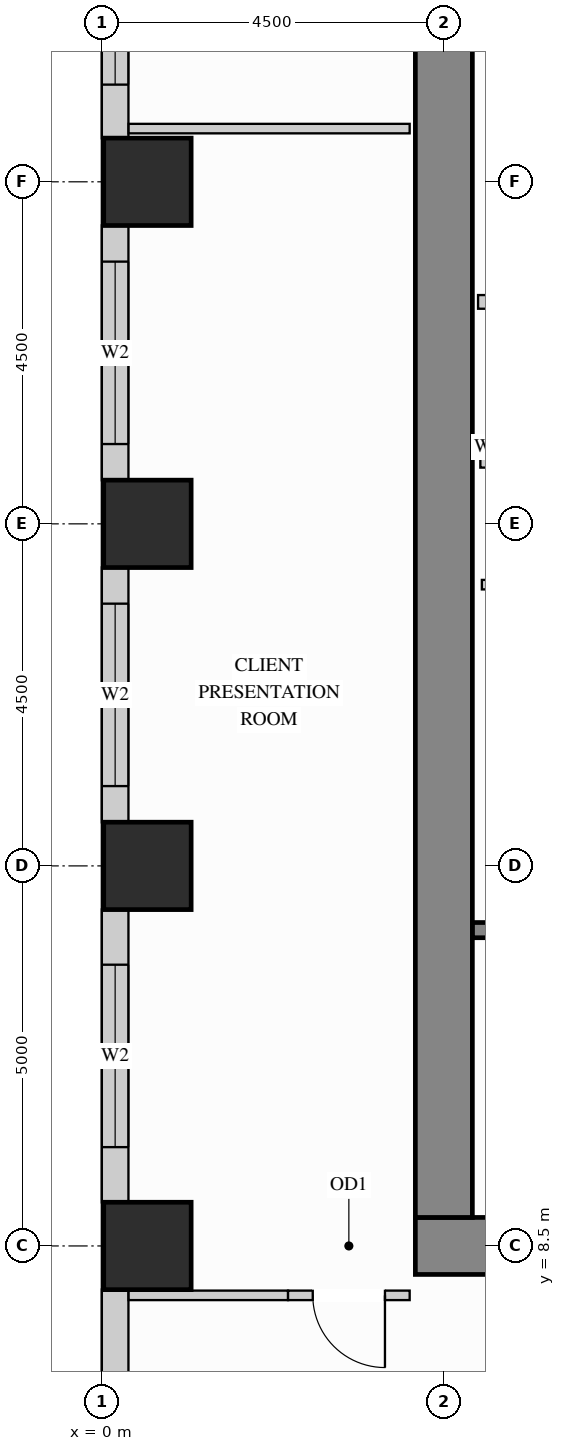
"""IFC4 building model, lengths in metres.
Left out: names, types, materials, properties, quantities, classifications, styles, units other than length and angle.
Written with IfcOpenShell. Run it as: python <this file> out.ifc"""

import sys

from ifc_helpers import new_model, si_unit, direction, frame, frame_2d, origin, origin_2d, place, context, subcontext, project, spatial, rectangle, extrude, source, transform, mapped, element, fill, save


model = new_model("IFC4")
c1 = context("Model", 3, precision=1e-05, world=origin(), true_north=direction((0.0, 1.0)))
c2 = subcontext(c1, "Body", "Model", "MODEL_VIEW")
j1 = project(units=[si_unit("LENGTHUNIT", "METRE"), si_unit("PLANEANGLEUNIT", "RADIAN")], contexts=[c1])
p1 = place(None, origin())
s1 = spatial("IfcSite", under=j1, at=p1, CompositionType="ELEMENT")
p2 = place(p1, origin())
s2 = spatial("IfcBuilding", under=s1, at=p2, CompositionType="ELEMENT")
p3 = place(p2, frame((0.0, 0.0, 109.8)))
s3 = spatial("IfcBuildingStorey", under=s2, at=p3, CompositionType="ELEMENT", Elevation=109.8)
m1 = source(origin(), c2, "Body", "SweptSolid", [
    extrude(rectangle(XDim=1.15, YDim=1.15, at=origin_2d()), origin(), (0.0, 0.0, 1.0), 3.38),
])
for number, where, z_axis, x_axis in (
    (1, (0.6, 13.5, 0.0), (0.0, 0.0, 1.0), (1.0, 0.0, 0.0)),
    (2, (0.6, 18.0, 0.0), (0.0, 0.0, 1.0), (1.0, 0.0, 0.0)),
    (3, (0.6, 22.5, 0.0), (0.0, 0.0, 1.0), (1.0, 0.0, 0.0)),
    (4, (0.6, 8.5, 0.0), (0.0, 0.0, 1.0), (1.0, 0.0, 0.0)),
):
    element("IfcColumn", number, at=place(p3, frame(where, z_axis=z_axis, x_axis=x_axis)), inside=s3, PredefinedType="COLUMN", context=c2, shape_type="MappedRepresentation", body=[
        mapped(m1, transform((0.0, 0.0, 0.0), x_axis=(1.0, 0.0, 0.0), y_axis=(0.0, 1.0, 0.0), z_axis=(0.0, 0.0, 1.0))),
    ])
m2 = source(origin(), c2, "Body", "SweptSolid", [
    extrude(rectangle(XDim=10.75, YDim=0.75, at=frame_2d((5.375, 0.0))), origin(), (0.0, 0.0, 1.0), 3.38),
])
p4 = place(p3, frame((4.125, 8.5, 0.0), z_axis=(0.0, 0.0, 1.0), x_axis=(1.0, 0.0, 0.0)))
e5 = element("IfcWall", 5, at=p4, inside=s3, PredefinedType="SHEAR", context=c2, shape_type="MappedRepresentation", body=[
    mapped(m2, transform((0.0, 0.0, 0.0), x_axis=(1.0, 0.0, 0.0), y_axis=(0.0, 1.0, 0.0), z_axis=(0.0, 0.0, 1.0))),
])
m3 = source(origin(), c2, "Body", "SweptSolid", [
    extrude(rectangle(XDim=20.25, YDim=0.75, at=frame_2d((10.125, 0.0))), origin(), (0.0, 0.0, 1.0), 3.38),
])
p5 = place(p3, frame((4.5, 8.875, 0.0), z_axis=(0.0, 0.0, 1.0), x_axis=(0.0, 1.0, 0.0)))
e6 = element("IfcWall", 6, at=p5, inside=s3, PredefinedType="SHEAR", context=c2, shape_type="MappedRepresentation", body=[
    mapped(m3, transform((0.0, 0.0, 0.0), x_axis=(1.0, 0.0, 0.0), y_axis=(0.0, 1.0, 0.0), z_axis=(0.0, 0.0, 1.0))),
])
p6 = place(p3, frame((0.175, 26.227, 0.0), z_axis=(0.0, 0.0, 1.0), x_axis=(0.0, -1.0, 0.0)))
e7 = element("IfcWall", 7, at=p6, inside=s3, PredefinedType="SOLIDWALL", context=c2, shape_type="SweptSolid", body=[
    extrude(rectangle(XDim=3.154, YDim=0.35, at=frame_2d((1.577, 0.0))), origin(), (0.0, 0.0, 1.0), 3.365),
])
p7 = place(p6, frame((0.648, 0.0, 0.78)))
e8 = element("IfcOpeningElement", 8, at=p7, cuts=e7, PredefinedType="OPENING", context=c2, shape_type="SweptSolid", body=[
    extrude(rectangle(XDim=1.8, YDim=2.1, at=frame_2d((0.9, 1.05))), frame((0.0, 0.185, 0.0), z_axis=(0.0, -1.0, 0.0), x_axis=(1.0, 0.0, 0.0)), (0.0, 0.0, 1.0), 0.37),
])
p8 = place(p3, frame((0.175, 21.927, 0.0), z_axis=(0.0, 0.0, 1.0), x_axis=(0.0, -1.0, 0.0)))
e9 = element("IfcWall", 9, at=p8, inside=s3, PredefinedType="SOLIDWALL", context=c2, shape_type="SweptSolid", body=[
    extrude(rectangle(XDim=3.354, YDim=0.35, at=frame_2d((1.677, 0.0))), origin(), (0.0, 0.0, 1.0), 3.365),
])
p9 = place(p8, frame((0.477, 0.0, 0.78)))
e10 = element("IfcOpeningElement", 10, at=p9, cuts=e9, PredefinedType="OPENING", context=c2, shape_type="SweptSolid", body=[
    extrude(rectangle(XDim=2.4, YDim=2.1, at=frame_2d((1.2, 1.05))), frame((0.0, 0.185, 0.0), z_axis=(0.0, -1.0, 0.0), x_axis=(1.0, 0.0, 0.0)), (0.0, 0.0, 1.0), 0.37),
])
p10 = place(p3, frame((0.175, 17.427, 0.0), z_axis=(0.0, 0.0, 1.0), x_axis=(0.0, -1.0, 0.0)))
e11 = element("IfcWall", 11, at=p10, inside=s3, PredefinedType="SOLIDWALL", context=c2, shape_type="SweptSolid", body=[
    extrude(rectangle(XDim=3.354, YDim=0.35, at=frame_2d((1.677, 0.0))), origin(), (0.0, 0.0, 1.0), 3.365),
])
p11 = place(p10, frame((0.477, 0.0, 0.78)))
e12 = element("IfcOpeningElement", 12, at=p11, cuts=e11, PredefinedType="OPENING", context=c2, shape_type="SweptSolid", body=[
    extrude(rectangle(XDim=2.4, YDim=2.1, at=frame_2d((1.2, 1.05))), frame((0.0, 0.185, 0.0), z_axis=(0.0, -1.0, 0.0), x_axis=(1.0, 0.0, 0.0)), (0.0, 0.0, 1.0), 0.37),
])
p12 = place(p3, frame((0.175, 12.927, 0.0), z_axis=(0.0, 0.0, 1.0), x_axis=(0.0, -1.0, 0.0)))
e13 = element("IfcWall", 13, at=p12, inside=s3, PredefinedType="SOLIDWALL", context=c2, shape_type="SweptSolid", body=[
    extrude(rectangle(XDim=3.854, YDim=0.35, at=frame_2d((1.927, 0.0))), origin(), (0.0, 0.0, 1.0), 3.365),
])
p13 = place(p12, frame((0.727, 0.0, 0.78)))
e14 = element("IfcOpeningElement", 14, at=p13, cuts=e13, PredefinedType="OPENING", context=c2, shape_type="SweptSolid", body=[
    extrude(rectangle(XDim=2.4, YDim=2.1, at=frame_2d((1.2, 1.05))), frame((0.0, 0.185, 0.0), z_axis=(0.0, -1.0, 0.0), x_axis=(1.0, 0.0, 0.0)), (0.0, 0.0, 1.0), 0.37),
])
p14 = place(p3, frame((0.175, 7.927, 0.0), z_axis=(0.0, 0.0, 1.0), x_axis=(0.0, -1.0, 0.0)))
e15 = element("IfcWall", 15, at=p14, inside=s3, PredefinedType="SOLIDWALL", context=c2, shape_type="SweptSolid", body=[
    extrude(rectangle(XDim=3.854, YDim=0.35, at=frame_2d((1.927, 0.0))), origin(), (0.0, 0.0, 1.0), 3.365),
])
p15 = place(p14, frame((2.156, 0.0, 0.78)))
e16 = element("IfcOpeningElement", 16, at=p15, cuts=e15, PredefinedType="OPENING", context=c2, shape_type="SweptSolid", body=[
    extrude(rectangle(XDim=1.2, YDim=2.1, at=frame_2d((0.6, 1.05))), frame((0.0, 0.185, 0.0), z_axis=(0.0, -1.0, 0.0), x_axis=(1.0, 0.0, 0.0)), (0.0, 0.0, 1.0), 0.37),
])
m4 = source(origin(), c2, "Body", "SweptSolid", [
    extrude(rectangle(XDim=2.2, YDim=0.18, at=frame_2d((1.1, 0.0))), origin(), (0.0, 0.0, 1.0), 3.365),
])
p16 = place(p3, frame((4.95, 20.92, 0.0), z_axis=(0.0, 0.0, 1.0), x_axis=(1.0, 0.0, 0.0)))
e17 = element("IfcWall", 17, at=p16, inside=s3, PredefinedType="PARTITIONING", context=c2, shape_type="MappedRepresentation", body=[
    mapped(m4, transform((0.0, 0.0, 0.0), x_axis=(1.0, 0.0, 0.0), y_axis=(0.0, 1.0, 0.0), z_axis=(0.0, 0.0, 1.0))),
])
p17 = place(p3, frame((5.0, 17.2, 0.0), z_axis=(0.0, 0.0, 1.0), x_axis=(1.0, 0.0, 0.0)))
e18 = element("IfcWall", 18, at=p17, inside=s3, PredefinedType="PARTITIONING", context=c2, shape_type="SweptSolid", body=[
    extrude(rectangle(XDim=2.4, YDim=0.125, at=frame_2d((1.2, 0.0))), origin(), (0.0, 0.0, 1.0), 3.365),
])
p18 = place(p17, frame((0.7, 0.0, 0.0)))
e19 = element("IfcOpeningElement", 19, at=p18, cuts=e18, PredefinedType="OPENING", context=c2, shape_type="SweptSolid", body=[
    extrude(rectangle(XDim=0.85, YDim=2.1, at=frame_2d((0.425, 1.05))), frame((0.0, 0.073, 0.0), z_axis=(0.0, -1.0, 0.0), x_axis=(1.0, 0.0, 0.0)), (0.0, 0.0, 1.0), 0.145),
])
m5 = source(origin(), c2, "Body", "SweptSolid", [
    extrude(rectangle(XDim=2.098, YDim=0.125, at=frame_2d((1.049, 0.0))), origin(), (0.0, 0.0, 1.0), 3.365),
])
p19 = place(p3, frame((0.352, 7.85, 0.0), z_axis=(0.0, 0.0, 1.0), x_axis=(1.0, 0.0, 0.0)))
e20 = element("IfcWall", 20, at=p19, inside=s3, PredefinedType="PARTITIONING", context=c2, shape_type="MappedRepresentation", body=[
    mapped(m5, transform((0.0, 0.0, 0.0), x_axis=(1.0, 0.0, 0.0), y_axis=(0.0, 1.0, 0.0), z_axis=(0.0, 0.0, 1.0))),
])
p20 = place(p3, frame((2.45, 7.85, 0.0), z_axis=(0.0, 0.0, 1.0), x_axis=(1.0, 0.0, 0.0)))
e21 = element("IfcWall", 21, at=p20, inside=s3, PredefinedType="PARTITIONING", context=c2, shape_type="SweptSolid", body=[
    extrude(rectangle(XDim=1.6, YDim=0.125, at=frame_2d((0.8, 0.0))), origin(), (0.0, 0.0, 1.0), 3.365),
])
p21 = place(p20, frame((0.325, 0.0, 0.0)))
e22 = element("IfcOpeningElement", 22, at=p21, cuts=e21, PredefinedType="OPENING", context=c2, shape_type="SweptSolid", body=[
    extrude(rectangle(XDim=0.95, YDim=2.15, at=frame_2d((0.475, 1.075))), frame((0.0, 0.073, 0.0), z_axis=(0.0, -1.0, 0.0), x_axis=(1.0, 0.0, 0.0)), (0.0, 0.0, 1.0), 0.145),
])
m6 = source(origin(), c2, "Body", "SweptSolid", [
    extrude(rectangle(XDim=3.698, YDim=0.125, at=frame_2d((1.849, 0.0))), origin(), (0.0, 0.0, 1.0), 3.365),
])
p22 = place(p3, frame((0.352, 23.2, 0.0), z_axis=(0.0, 0.0, 1.0), x_axis=(1.0, 0.0, 0.0)))
e23 = element("IfcWall", 23, at=p22, inside=s3, PredefinedType="PARTITIONING", context=c2, shape_type="MappedRepresentation", body=[
    mapped(m6, transform((0.0, 0.0, 0.0), x_axis=(1.0, 0.0, 0.0), y_axis=(0.0, 1.0, 0.0), z_axis=(0.0, 0.0, 1.0))),
])
m7 = source(origin(), c2, "Body", "SweptSolid", [
    extrude(rectangle(XDim=2.09, YDim=0.2, at=frame_2d((1.045, 0.0))), origin(), (0.0, 0.0, 1.0), 3.365),
])
p23 = place(p3, frame((4.98, 18.84, 0.0), z_axis=(0.0, 0.0, 1.0), x_axis=(1.0, 0.0, 0.0)))
e24 = element("IfcWall", 24, at=p23, inside=s3, PredefinedType="PARTITIONING", context=c2, shape_type="MappedRepresentation", body=[
    mapped(m7, transform((0.0, 0.0, 0.0), x_axis=(1.0, 0.0, 0.0), y_axis=(0.0, 1.0, 0.0), z_axis=(0.0, 0.0, 1.0))),
])
p24 = place(p3, frame((4.877, 12.655, 0.0), z_axis=(0.0, 0.0, 1.0), x_axis=(1.0, 0.0, 0.0)))
e25 = element("IfcWall", 25, at=p24, inside=s3, PredefinedType="SHEAR", context=c2, shape_type="SweptSolid", body=[
    extrude(rectangle(XDim=7.528, YDim=0.2, at=frame_2d((3.764, 0.0))), origin(), (0.0, 0.0, 1.0), 3.38),
])
p25 = place(p24, frame((0.4, 0.0, 0.0)))
e26 = element("IfcOpeningElement", 26, at=p25, cuts=e25, PredefinedType="OPENING", context=c2, shape_type="SweptSolid", body=[
    extrude(rectangle(XDim=1.1, YDim=2.15, at=frame_2d((0.55, 1.075))), frame((0.0, 0.11, 0.0), z_axis=(0.0, -1.0, 0.0), x_axis=(1.0, 0.0, 0.0)), (0.0, 0.0, 1.0), 0.22),
])
m8 = source(origin(), c2, "Body", "SweptSolid", [
    extrude(rectangle(XDim=0.95, YDim=2.15, at=frame_2d((0.475, 1.075))), frame((0.0, 0.025, 0.0), z_axis=(0.0, -1.0, 0.0), x_axis=(1.0, 0.0, 0.0)), (0.0, 0.0, 1.0), 0.05),
])
p26 = place(p21, origin())
e27 = element("IfcDoor", 27, at=p26, inside=s3, OperationType="SINGLE_SWING_RIGHT", PredefinedType="DOOR", context=c2, shape_type="MappedRepresentation", body=[
    mapped(m8, transform((0.0, 0.0, 0.0), x_axis=(1.0, 0.0, 0.0), y_axis=(0.0, 1.0, 0.0), z_axis=(0.0, 0.0, 1.0))),
])
fill(e22, e27)
m9 = source(origin(), c2, "Body", "SweptSolid", [
    extrude(rectangle(XDim=1.8, YDim=2.1, at=frame_2d((0.9, 1.05))), frame((0.0, 0.03, 0.0), z_axis=(0.0, -1.0, 0.0), x_axis=(1.0, 0.0, 0.0)), (0.0, 0.0, 1.0), 0.06),
])
p27 = place(p7, origin())
e28 = element("IfcWindow", 28, at=p27, inside=s3, PartitioningType="SINGLE_PANEL", PredefinedType="WINDOW", context=c2, shape_type="MappedRepresentation", body=[
    mapped(m9, transform((0.0, 0.0, 0.0), x_axis=(1.0, 0.0, 0.0), y_axis=(0.0, 1.0, 0.0), z_axis=(0.0, 0.0, 1.0))),
])
fill(e8, e28)
m10 = source(origin(), c2, "Body", "SweptSolid", [
    extrude(rectangle(XDim=2.4, YDim=2.1, at=frame_2d((1.2, 1.05))), frame((0.0, 0.03, 0.0), z_axis=(0.0, -1.0, 0.0), x_axis=(1.0, 0.0, 0.0)), (0.0, 0.0, 1.0), 0.06),
])
p28 = place(p9, origin())
e29 = element("IfcWindow", 29, at=p28, inside=s3, PartitioningType="SINGLE_PANEL", PredefinedType="WINDOW", context=c2, shape_type="MappedRepresentation", body=[
    mapped(m10, transform((0.0, 0.0, 0.0), x_axis=(1.0, 0.0, 0.0), y_axis=(0.0, 1.0, 0.0), z_axis=(0.0, 0.0, 1.0))),
])
fill(e10, e29)
p29 = place(p11, origin())
e30 = element("IfcWindow", 30, at=p29, inside=s3, PartitioningType="SINGLE_PANEL", PredefinedType="WINDOW", context=c2, shape_type="MappedRepresentation", body=[
    mapped(m10, transform((0.0, 0.0, 0.0), x_axis=(1.0, 0.0, 0.0), y_axis=(0.0, 1.0, 0.0), z_axis=(0.0, 0.0, 1.0))),
])
fill(e12, e30)
p30 = place(p13, origin())
e31 = element("IfcWindow", 31, at=p30, inside=s3, PartitioningType="SINGLE_PANEL", PredefinedType="WINDOW", context=c2, shape_type="MappedRepresentation", body=[
    mapped(m10, transform((0.0, 0.0, 0.0), x_axis=(1.0, 0.0, 0.0), y_axis=(0.0, 1.0, 0.0), z_axis=(0.0, 0.0, 1.0))),
])
fill(e14, e31)
save(model, sys.argv[1])
